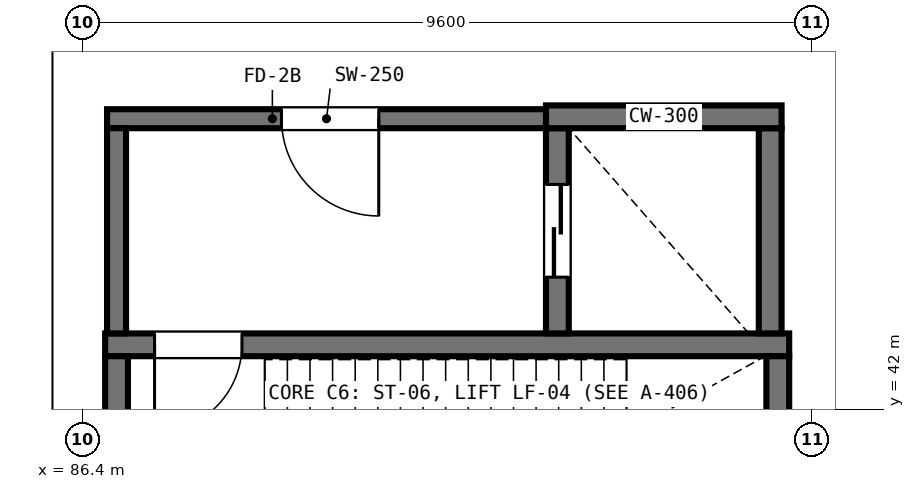
"""IFC4 building model, lengths in metres.
Left out: names, types, materials, properties, quantities, classifications, styles, units other than length and angle.
Written with IfcOpenShell. Run it as: python <this file> out.ifc"""

import sys

from ifc_helpers import new_model, si_unit, direction, frame, frame_2d, origin, place, context, subcontext, project, spatial, rectangle, extrude, element, fill, save


model = new_model("IFC4")
c1 = context("Model", 3, precision=1e-05, world=origin(), true_north=direction((0.0, 1.0)))
c2 = subcontext(c1, "Body", "Model", "MODEL_VIEW")
j1 = project(units=[si_unit("LENGTHUNIT", "METRE"), si_unit("PLANEANGLEUNIT", "RADIAN")], contexts=[c1])
p1 = place(None, origin())
s1 = spatial("IfcSite", under=j1, at=p1, CompositionType="ELEMENT")
p2 = place(p1, origin())
s2 = spatial("IfcBuilding", under=s1, at=p2, CompositionType="ELEMENT")
p3 = place(p2, origin())
s3 = spatial("IfcBuildingStorey", under=s2, at=p3, CompositionType="ELEMENT", Elevation=0.0)
p4 = place(p3, frame((95.7, 42.85, 0.0), z_axis=(0.0, 0.0, 1.0), x_axis=(-1.0, 0.0, 0.0)))
e1 = element("IfcWall", 1, at=p4, inside=s3, PredefinedType="SHEAR", context=c2, shape_type="SweptSolid", body=[
    extrude(rectangle(XDim=9.0, YDim=0.3, at=frame_2d((4.5, 0.0))), origin(), (0.0, 0.0, 1.0), 5.75),
])
p5 = place(p4, frame((7.2, 0.0, 0.0)))
e2 = element("IfcOpeningElement", 2, at=p5, cuts=e1, PredefinedType="OPENING", context=c2, shape_type="SweptSolid", body=[
    extrude(rectangle(XDim=1.15, YDim=2.15, at=frame_2d((0.575, 1.075))), frame((0.0, 0.16, 0.0), z_axis=(0.0, -1.0, 0.0), x_axis=(1.0, 0.0, 0.0)), (0.0, 0.0, 1.0), 0.32),
])
for number, where, z_axis, x_axis in (
    (3, (86.85, 39.05, 0.0), (0.0, 0.0, 1.0), (0.0, 1.0, 0.0)),
    (4, (95.55, 42.7, 0.0), (0.0, 0.0, 1.0), (0.0, -1.0, 0.0)),
):
    element("IfcWall", number, at=place(p3, frame(where, z_axis=z_axis, x_axis=x_axis)), inside=s3, PredefinedType="SHEAR", context=c2, shape_type="SweptSolid", body=[
        extrude(rectangle(XDim=3.65, YDim=0.3, at=frame_2d((1.825, 0.0))), origin(), (0.0, 0.0, 1.0), 5.75),
    ])
p6 = place(p3, frame((92.65, 45.7, 0.0), z_axis=(0.0, 0.0, 1.0), x_axis=(0.0, -1.0, 0.0)))
e5 = element("IfcWall", 5, at=p6, inside=s3, PredefinedType="SHEAR", context=c2, shape_type="SweptSolid", body=[
    extrude(rectangle(XDim=2.7, YDim=0.3, at=frame_2d((1.35, 0.0))), origin(), (0.0, 0.0, 1.0), 5.75),
])
p7 = place(p6, frame((0.74, 0.0, 0.0)))
e6 = element("IfcOpeningElement", 6, at=p7, cuts=e5, PredefinedType="OPENING", context=c2, shape_type="SweptSolid", body=[
    extrude(rectangle(XDim=1.22, YDim=2.15, at=frame_2d((0.61, 1.075))), frame((0.0, 0.16, 0.0), z_axis=(0.0, -1.0, 0.0), x_axis=(1.0, 0.0, 0.0)), (0.0, 0.0, 1.0), 0.32),
])
p8 = place(p3, frame((95.45, 43.0, 0.0), z_axis=(0.0, 0.0, 1.0), x_axis=(0.0, 1.0, 0.0)))
e7 = element("IfcWall", 7, at=p8, inside=s3, PredefinedType="SHEAR", context=c2, shape_type="SweptSolid", body=[
    extrude(rectangle(XDim=2.7, YDim=0.3, at=frame_2d((1.35, 0.0))), origin(), (0.0, 0.0, 1.0), 5.75),
])
p9 = place(p3, frame((92.5, 45.85, 0.0), z_axis=(0.0, 0.0, 1.0), x_axis=(1.0, 0.0, 0.0)))
e8 = element("IfcWall", 8, at=p9, inside=s3, PredefinedType="SHEAR", context=c2, shape_type="SweptSolid", body=[
    extrude(rectangle(XDim=3.1, YDim=0.3, at=frame_2d((1.55, 0.0))), origin(), (0.0, 0.0, 1.0), 5.75),
])
p10 = place(p3, frame((92.5, 45.825, 0.0), z_axis=(0.0, 0.0, 1.0), x_axis=(-1.0, 0.0, 0.0)))
e9 = element("IfcWall", 9, at=p10, inside=s3, PredefinedType="SHEAR", context=c2, shape_type="SweptSolid", body=[
    extrude(rectangle(XDim=5.775, YDim=0.25, at=frame_2d((2.887, 0.0))), origin(), (0.0, 0.0, 1.0), 5.75),
])
p11 = place(p10, frame((2.2, 0.0, 0.0)))
e10 = element("IfcOpeningElement", 10, at=p11, cuts=e9, PredefinedType="OPENING", context=c2, shape_type="SweptSolid", body=[
    extrude(rectangle(XDim=1.28, YDim=2.2, at=frame_2d((0.64, 1.1))), frame((0.0, 0.135, 0.0), z_axis=(0.0, -1.0, 0.0), x_axis=(1.0, 0.0, 0.0)), (0.0, 0.0, 1.0), 0.27),
])
p12 = place(p3, frame((86.85, 43.0, 0.0), z_axis=(0.0, 0.0, 1.0), x_axis=(0.0, 1.0, 0.0)))
e11 = element("IfcWall", 11, at=p12, inside=s3, PredefinedType="SHEAR", context=c2, shape_type="SweptSolid", body=[
    extrude(rectangle(XDim=2.7, YDim=0.25, at=frame_2d((1.35, 0.0))), origin(), (0.0, 0.0, 1.0), 5.75),
])
p13 = place(p5, origin())
e12 = element("IfcDoor", 12, at=p13, inside=s3, OperationType="SINGLE_SWING_RIGHT", PredefinedType="DOOR", context=c2, shape_type="SweptSolid", body=[
    extrude(rectangle(XDim=1.15, YDim=2.15, at=frame_2d((0.575, 1.075))), frame((0.0, 0.025, 0.0), z_axis=(0.0, -1.0, 0.0), x_axis=(1.0, 0.0, 0.0)), (0.0, 0.0, 1.0), 0.05),
])
fill(e2, e12)
p14 = place(p7, frame((1.22, 0.0, 0.0), z_axis=(0.0, 0.0, 1.0), x_axis=(-1.0, 0.0, 0.0)))
e13 = element("IfcDoor", 13, at=p14, inside=s3, OperationType="DOUBLE_DOOR_SLIDING", PredefinedType="DOOR", context=c2, shape_type="SweptSolid", body=[
    extrude(rectangle(XDim=1.22, YDim=2.15, at=frame_2d((0.61, 1.075))), frame((0.0, 0.025, 0.0), z_axis=(0.0, -1.0, 0.0), x_axis=(1.0, 0.0, 0.0)), (0.0, 0.0, 1.0), 0.05),
])
fill(e6, e13)
p15 = place(p11, origin())
e14 = element("IfcDoor", 14, at=p15, inside=s3, OperationType="SINGLE_SWING_LEFT", PredefinedType="DOOR", context=c2, shape_type="SweptSolid", body=[
    extrude(rectangle(XDim=1.28, YDim=2.2, at=frame_2d((0.64, 1.1))), frame((0.0, 0.025, 0.0), z_axis=(0.0, -1.0, 0.0), x_axis=(1.0, 0.0, 0.0)), (0.0, 0.0, 1.0), 0.05),
])
fill(e10, e14)
save(model, sys.argv[1])
